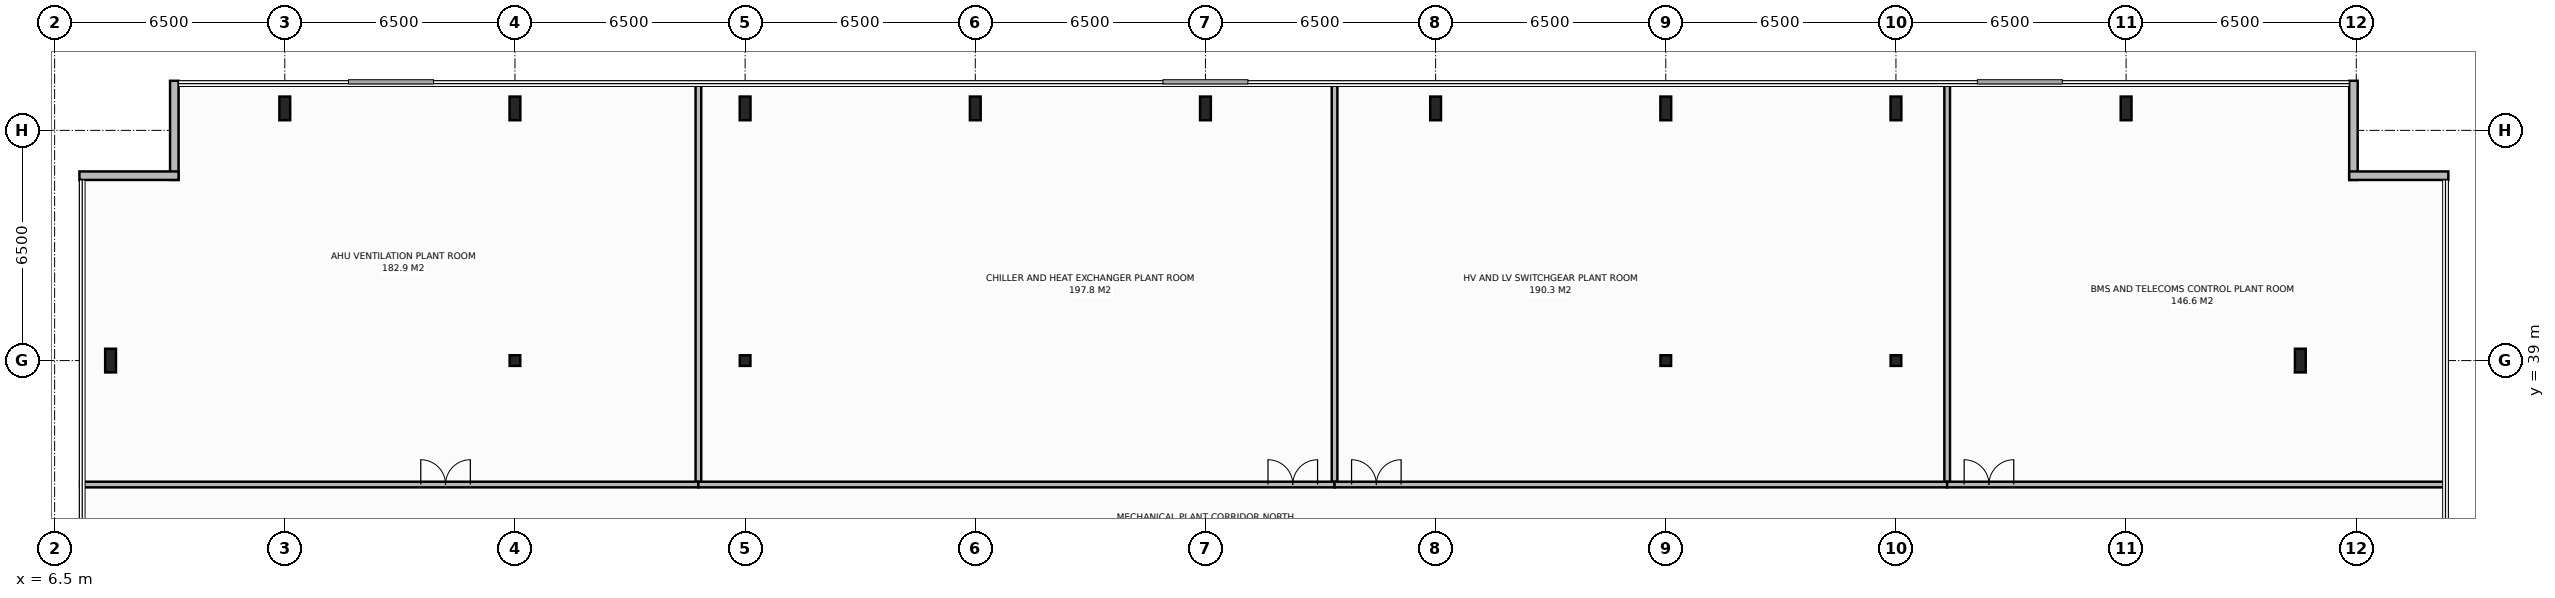
"""IFC4 building model, lengths in metres.
Left out: names, types, materials, properties, quantities, classifications, styles, units other than length and angle.
Written with IfcOpenShell. Run it as: python <this file> out.ifc"""

import sys

from ifc_helpers import new_model, si_unit, direction, frame, frame_2d, origin, origin_2d, place, context, subcontext, project, spatial, rectangle, i_section, extrude, element, fill, save


model = new_model("IFC4")
c1 = context("Model", 3, precision=1e-05, world=origin(), true_north=direction((0.0, 1.0)))
c2 = subcontext(c1, "Body", "Model", "MODEL_VIEW")
j1 = project(units=[si_unit("LENGTHUNIT", "METRE"), si_unit("PLANEANGLEUNIT", "RADIAN")], contexts=[c1])
p1 = place(None, origin())
s1 = spatial("IfcSite", under=j1, at=p1, CompositionType="ELEMENT")
p2 = place(p1, origin())
s2 = spatial("IfcBuilding", under=s1, at=p2, CompositionType="ELEMENT")
p3 = place(p2, frame((0.0, 0.0, 310.4)))
s3 = spatial("IfcBuildingStorey", under=s2, at=p3, CompositionType="ELEMENT", Elevation=310.4)
for number, where, z_axis, x_axis in (
    (1, (19.5, 39.0, 0.0), (0.0, 0.0, 1.0), (1.0, 0.0, 0.0)),
    (2, (58.5, 39.0, 0.0), (0.0, 0.0, 1.0), (1.0, 0.0, 0.0)),
    (3, (26.0, 39.0, 0.0), (0.0, 0.0, 1.0), (1.0, 0.0, 0.0)),
    (4, (52.0, 39.0, 0.0), (0.0, 0.0, 1.0), (1.0, 0.0, 0.0)),
):
    element("IfcColumn", number, at=place(p3, frame(where, z_axis=z_axis, x_axis=x_axis)), inside=s3, PredefinedType="COLUMN", context=c2, shape_type="SweptSolid", body=[
        extrude(i_section(OverallWidth=0.3, OverallDepth=0.3, WebThickness=0.011, FlangeThickness=0.019, at=origin_2d()), origin(), (0.0, 0.0, 1.0), 5.0),
    ])
for number, where, z_axis, x_axis in (
    (5, (13.0, 46.12, 0.0), (0.0, 0.0, 1.0), (1.0, 0.0, 0.0)),
    (6, (19.5, 46.12, 0.0), (0.0, 0.0, 1.0), (1.0, 0.0, 0.0)),
    (7, (26.0, 46.12, 0.0), (0.0, 0.0, 1.0), (1.0, 0.0, 0.0)),
    (8, (32.5, 46.12, 0.0), (0.0, 0.0, 1.0), (1.0, 0.0, 0.0)),
    (9, (39.0, 46.12, 0.0), (0.0, 0.0, 1.0), (1.0, 0.0, 0.0)),
    (10, (45.5, 46.12, 0.0), (0.0, 0.0, 1.0), (1.0, 0.0, 0.0)),
    (11, (52.0, 46.12, 0.0), (0.0, 0.0, 1.0), (1.0, 0.0, 0.0)),
    (12, (58.5, 46.12, 0.0), (0.0, 0.0, 1.0), (1.0, 0.0, 0.0)),
    (13, (65.0, 46.12, 0.0), (0.0, 0.0, 1.0), (1.0, 0.0, 0.0)),
    (14, (8.08, 39.0, 0.0), (0.0, 0.0, 1.0), (1.0, 0.0, 0.0)),
    (15, (69.92, 39.0, 0.0), (0.0, 0.0, 1.0), (1.0, 0.0, 0.0)),
):
    element("IfcColumn", number, at=place(p3, frame(where, z_axis=z_axis, x_axis=x_axis)), inside=s3, PredefinedType="COLUMN", context=c2, shape_type="SweptSolid", body=[
        extrude(i_section(OverallWidth=0.305, OverallDepth=0.668, WebThickness=0.021, FlangeThickness=0.04, at=origin_2d()), origin(), (0.0, 0.0, 1.0), 5.0),
    ])
p4 = place(p3, frame((9.88, 44.1, 0.0), z_axis=(0.0, 0.0, 1.0), x_axis=(0.0, 1.0, 0.0)))
e16 = element("IfcWall", 16, at=p4, inside=s3, PredefinedType="STANDARD", context=c2, shape_type="SweptSolid", body=[
    extrude(rectangle(XDim=2.8, YDim=0.24, at=frame_2d((1.4, 0.0))), origin(), (0.0, 0.0, 1.0), 4.72),
])
p5 = place(p3, frame((7.2, 44.22, 0.0), z_axis=(0.0, 0.0, 1.0), x_axis=(1.0, 0.0, 0.0)))
e17 = element("IfcWall", 17, at=p5, inside=s3, PredefinedType="STANDARD", context=c2, shape_type="SweptSolid", body=[
    extrude(rectangle(XDim=2.8, YDim=0.24, at=frame_2d((1.4, 0.0))), origin(), (0.0, 0.0, 1.0), 4.72),
])
p6 = place(p3, frame((71.42, 46.9, 0.0), z_axis=(0.0, 0.0, 1.0), x_axis=(0.0, -1.0, 0.0)))
e18 = element("IfcWall", 18, at=p6, inside=s3, PredefinedType="STANDARD", context=c2, shape_type="SweptSolid", body=[
    extrude(rectangle(XDim=2.8, YDim=0.24, at=frame_2d((1.4, 0.0))), origin(), (0.0, 0.0, 1.0), 4.72),
])
p7 = place(p3, frame((71.3, 44.22, 0.0), z_axis=(0.0, 0.0, 1.0), x_axis=(1.0, 0.0, 0.0)))
e19 = element("IfcWall", 19, at=p7, inside=s3, PredefinedType="STANDARD", context=c2, shape_type="SweptSolid", body=[
    extrude(rectangle(XDim=2.8, YDim=0.24, at=frame_2d((1.4, 0.0))), origin(), (0.0, 0.0, 1.0), 4.72),
])
p8 = place(p3, frame((24.68, 35.5, 0.0), z_axis=(0.0, 0.0, 1.0), x_axis=(0.0, 1.0, 0.0)))
e20 = element("IfcWall", 20, at=p8, inside=s3, PredefinedType="STANDARD", context=c2, shape_type="SweptSolid", body=[
    extrude(rectangle(XDim=11.38, YDim=0.16, at=frame_2d((5.69, 0.0))), origin(), (0.0, 0.0, 1.0), 4.72),
])
p9 = place(p3, frame((7.22, 35.5, 0.0), z_axis=(0.0, 0.0, 1.0), x_axis=(1.0, 0.0, 0.0)))
e21 = element("IfcWall", 21, at=p9, inside=s3, PredefinedType="STANDARD", context=c2, shape_type="SweptSolid", body=[
    extrude(rectangle(XDim=17.46, YDim=0.16, at=frame_2d((8.73, 0.0))), origin(), (0.0, 0.0, 1.0), 4.72),
])
p10 = place(p9, frame((9.62, 0.0, 0.0)))
e22 = element("IfcOpeningElement", 22, at=p10, cuts=e21, PredefinedType="OPENING", context=c2, shape_type="SweptSolid", body=[
    extrude(rectangle(XDim=1.4, YDim=2.2, at=frame_2d((0.7, 1.1))), frame((0.0, 0.09, 0.0), z_axis=(0.0, -1.0, 0.0), x_axis=(1.0, 0.0, 0.0)), (0.0, 0.0, 1.0), 0.18),
])
p11 = place(p3, frame((42.646, 35.5, 0.0), z_axis=(0.0, 0.0, 1.0), x_axis=(0.0, 1.0, 0.0)))
e23 = element("IfcWall", 23, at=p11, inside=s3, PredefinedType="STANDARD", context=c2, shape_type="SweptSolid", body=[
    extrude(rectangle(XDim=11.38, YDim=0.16, at=frame_2d((5.69, 0.0))), origin(), (0.0, 0.0, 1.0), 4.72),
])
p12 = place(p3, frame((24.68, 35.5, 0.0), z_axis=(0.0, 0.0, 1.0), x_axis=(1.0, 0.0, 0.0)))
e24 = element("IfcWall", 24, at=p12, inside=s3, PredefinedType="STANDARD", context=c2, shape_type="SweptSolid", body=[
    extrude(rectangle(XDim=17.966, YDim=0.16, at=frame_2d((8.983, 0.0))), origin(), (0.0, 0.0, 1.0), 4.72),
])
p13 = place(p12, frame((16.086, 0.0, 0.0)))
e25 = element("IfcOpeningElement", 25, at=p13, cuts=e24, PredefinedType="OPENING", context=c2, shape_type="SweptSolid", body=[
    extrude(rectangle(XDim=1.4, YDim=2.2, at=frame_2d((0.7, 1.1))), frame((0.0, 0.09, 0.0), z_axis=(0.0, -1.0, 0.0), x_axis=(1.0, 0.0, 0.0)), (0.0, 0.0, 1.0), 0.18),
])
p14 = place(p3, frame((59.947, 35.5, 0.0), z_axis=(0.0, 0.0, 1.0), x_axis=(0.0, 1.0, 0.0)))
e26 = element("IfcWall", 26, at=p14, inside=s3, PredefinedType="STANDARD", context=c2, shape_type="SweptSolid", body=[
    extrude(rectangle(XDim=11.38, YDim=0.16, at=frame_2d((5.69, 0.0))), origin(), (0.0, 0.0, 1.0), 4.72),
])
p15 = place(p3, frame((42.646, 35.5, 0.0), z_axis=(0.0, 0.0, 1.0), x_axis=(1.0, 0.0, 0.0)))
e27 = element("IfcWall", 27, at=p15, inside=s3, PredefinedType="STANDARD", context=c2, shape_type="SweptSolid", body=[
    extrude(rectangle(XDim=17.3, YDim=0.16, at=frame_2d((8.65, 0.0))), origin(), (0.0, 0.0, 1.0), 4.72),
])
p16 = place(p15, frame((0.48, 0.0, 0.0)))
e28 = element("IfcOpeningElement", 28, at=p16, cuts=e27, PredefinedType="OPENING", context=c2, shape_type="SweptSolid", body=[
    extrude(rectangle(XDim=1.4, YDim=2.2, at=frame_2d((0.7, 1.1))), frame((0.0, 0.09, 0.0), z_axis=(0.0, -1.0, 0.0), x_axis=(1.0, 0.0, 0.0)), (0.0, 0.0, 1.0), 0.18),
])
p17 = place(p3, frame((59.947, 35.5, 0.0), z_axis=(0.0, 0.0, 1.0), x_axis=(1.0, 0.0, 0.0)))
e29 = element("IfcWall", 29, at=p17, inside=s3, PredefinedType="STANDARD", context=c2, shape_type="SweptSolid", body=[
    extrude(rectangle(XDim=14.134, YDim=0.16, at=frame_2d((7.067, 0.0))), origin(), (0.0, 0.0, 1.0), 4.72),
])
p18 = place(p17, frame((0.48, 0.0, 0.0)))
e30 = element("IfcOpeningElement", 30, at=p18, cuts=e29, PredefinedType="OPENING", context=c2, shape_type="SweptSolid", body=[
    extrude(rectangle(XDim=1.4, YDim=2.2, at=frame_2d((0.7, 1.1))), frame((0.0, 0.09, 0.0), z_axis=(0.0, -1.0, 0.0), x_axis=(1.0, 0.0, 0.0)), (0.0, 0.0, 1.0), 0.18),
])
p19 = place(p10, origin())
e31 = element("IfcDoor", 31, at=p19, inside=s3, OperationType="DOUBLE_DOOR_SINGLE_SWING", PredefinedType="DOOR", context=c2, shape_type="SweptSolid", body=[
    extrude(rectangle(XDim=1.4, YDim=2.2, at=frame_2d((0.7, 1.1))), frame((0.0, 0.025, 0.0), z_axis=(0.0, -1.0, 0.0), x_axis=(1.0, 0.0, 0.0)), (0.0, 0.0, 1.0), 0.05),
])
fill(e22, e31)
p20 = place(p13, origin())
e32 = element("IfcDoor", 32, at=p20, inside=s3, OperationType="DOUBLE_DOOR_SINGLE_SWING", PredefinedType="DOOR", context=c2, shape_type="SweptSolid", body=[
    extrude(rectangle(XDim=1.4, YDim=2.2, at=frame_2d((0.7, 1.1))), frame((0.0, 0.025, 0.0), z_axis=(0.0, -1.0, 0.0), x_axis=(1.0, 0.0, 0.0)), (0.0, 0.0, 1.0), 0.05),
])
fill(e25, e32)
p21 = place(p16, origin())
e33 = element("IfcDoor", 33, at=p21, inside=s3, OperationType="DOUBLE_DOOR_SINGLE_SWING", PredefinedType="DOOR", context=c2, shape_type="SweptSolid", body=[
    extrude(rectangle(XDim=1.4, YDim=2.2, at=frame_2d((0.7, 1.1))), frame((0.0, 0.025, 0.0), z_axis=(0.0, -1.0, 0.0), x_axis=(1.0, 0.0, 0.0)), (0.0, 0.0, 1.0), 0.05),
])
fill(e28, e33)
p22 = place(p18, origin())
e34 = element("IfcDoor", 34, at=p22, inside=s3, OperationType="DOUBLE_DOOR_SINGLE_SWING", PredefinedType="DOOR", context=c2, shape_type="SweptSolid", body=[
    extrude(rectangle(XDim=1.4, YDim=2.2, at=frame_2d((0.7, 1.1))), frame((0.0, 0.025, 0.0), z_axis=(0.0, -1.0, 0.0), x_axis=(1.0, 0.0, 0.0)), (0.0, 0.0, 1.0), 0.05),
])
fill(e30, e34)
save(model, sys.argv[1])
